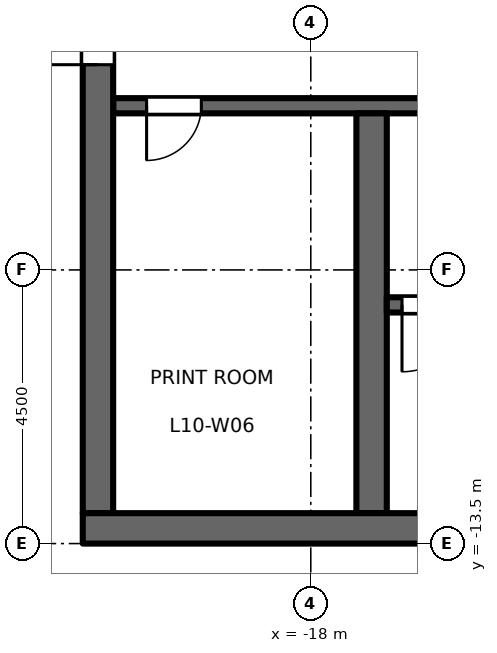
"""IFC4 building model, lengths in metres.
Left out: names, types, materials, properties, quantities, classifications, styles, units other than length and angle.
Written with IfcOpenShell. Run it as: python <this file> out.ifc"""

import sys

from ifc_helpers import new_model, si_unit, direction, frame, frame_2d, origin, place, context, subcontext, project, spatial, rectangle, extrude, element, fill, save


model = new_model("IFC4")
c1 = context("Model", 3, precision=1e-05, world=origin(), true_north=direction((0.0, 1.0)))
c2 = subcontext(c1, "Body", "Model", "MODEL_VIEW")
j1 = project(units=[si_unit("LENGTHUNIT", "METRE"), si_unit("PLANEANGLEUNIT", "RADIAN")], contexts=[c1])
p1 = place(None, origin())
s1 = spatial("IfcSite", under=j1, at=p1, CompositionType="ELEMENT")
p2 = place(p1, origin())
s2 = spatial("IfcBuilding", under=s1, at=p2, CompositionType="ELEMENT")
p3 = place(p2, frame((0.0, 0.0, 49.2)))
s3 = spatial("IfcBuildingStorey", under=s2, at=p3, CompositionType="ELEMENT", Elevation=49.2)
p4 = place(p3, frame((-12.15, -6.3, 0.0), z_axis=(0.0, 0.0, 1.0), x_axis=(-1.0, 0.0, 0.0)))
e1 = element("IfcWall", 1, at=p4, inside=s3, PredefinedType="SHEAR", context=c2, shape_type="SweptSolid", body=[
    extrude(rectangle(XDim=9.1, YDim=0.25, at=frame_2d((4.55, 0.0))), origin(), (0.0, 0.0, 1.0), 4.35),
])
p5 = place(p4, frame((1.8, 0.0, 0.0)))
e2 = element("IfcOpeningElement", 2, at=p5, cuts=e1, PredefinedType="OPENING", context=c2, shape_type="SweptSolid", body=[
    extrude(rectangle(XDim=1.0, YDim=2.1, at=frame_2d((0.5, 1.05))), frame((0.0, 0.135, 0.0), z_axis=(0.0, -1.0, 0.0), x_axis=(1.0, 0.0, 0.0)), (0.0, 0.0, 1.0), 0.27),
])
p6 = place(p4, frame((7.65, 0.0, 0.0)))
e3 = element("IfcOpeningElement", 3, at=p6, cuts=e1, PredefinedType="OPENING", context=c2, shape_type="SweptSolid", body=[
    extrude(rectangle(XDim=0.9, YDim=2.1, at=frame_2d((0.45, 1.05))), frame((0.0, 0.135, 0.0), z_axis=(0.0, -1.0, 0.0), x_axis=(1.0, 0.0, 0.0)), (0.0, 0.0, 1.0), 0.27),
])
p7 = place(p3, frame((-21.5, -13.0, 0.0), z_axis=(0.0, 0.0, 1.0), x_axis=(0.0, 1.0, 0.0)))
e4 = element("IfcWall", 4, at=p7, inside=s3, PredefinedType="SHEAR", context=c2, shape_type="SweptSolid", body=[
    extrude(rectangle(XDim=26.0, YDim=0.5, at=frame_2d((13.0, 0.0))), origin(), (0.0, 0.0, 1.0), 4.35),
])
p8 = place(p7, frame((16.825, 0.0, 0.0)))
e5 = element("IfcOpeningElement", 5, at=p8, cuts=e4, PredefinedType="OPENING", context=c2, shape_type="SweptSolid", body=[
    extrude(rectangle(XDim=1.8, YDim=2.1, at=frame_2d((0.9, 1.05))), frame((0.0, 0.26, 0.0), z_axis=(0.0, -1.0, 0.0), x_axis=(1.0, 0.0, 0.0)), (0.0, 0.0, 1.0), 0.52),
])
p9 = place(p7, frame((7.375, 0.0, 0.0)))
e6 = element("IfcOpeningElement", 6, at=p9, cuts=e4, PredefinedType="OPENING", context=c2, shape_type="SweptSolid", body=[
    extrude(rectangle(XDim=1.8, YDim=2.1, at=frame_2d((0.9, 1.05))), frame((0.0, 0.26, 0.0), z_axis=(0.0, -1.0, 0.0), x_axis=(1.0, 0.0, 0.0)), (0.0, 0.0, 1.0), 0.52),
])
p10 = place(p3, frame((-17.0, -13.0, 0.0), z_axis=(0.0, 0.0, 1.0), x_axis=(0.0, 1.0, 0.0)))
e7 = element("IfcWall", 7, at=p10, inside=s3, PredefinedType="SHEAR", context=c2, shape_type="SweptSolid", body=[
    extrude(rectangle(XDim=6.575, YDim=0.5, at=frame_2d((3.288, 0.0))), origin(), (0.0, 0.0, 1.0), 4.35),
])
p11 = place(p3, frame((-8.75, -9.575, 0.0), z_axis=(0.0, 0.0, 1.0), x_axis=(-1.0, 0.0, 0.0)))
e8 = element("IfcWall", 8, at=p11, inside=s3, PredefinedType="SHEAR", context=c2, shape_type="SweptSolid", body=[
    extrude(rectangle(XDim=8.0, YDim=0.25, at=frame_2d((4.0, 0.0))), origin(), (0.0, 0.0, 1.0), 4.35),
])
p12 = place(p11, frame((6.65, 0.0, 0.0)))
e9 = element("IfcOpeningElement", 9, at=p12, cuts=e8, PredefinedType="OPENING", context=c2, shape_type="SweptSolid", body=[
    extrude(rectangle(XDim=1.1, YDim=2.1, at=frame_2d((0.55, 1.05))), frame((0.0, 0.135, 0.0), z_axis=(0.0, -1.0, 0.0), x_axis=(1.0, 0.0, 0.0)), (0.0, 0.0, 1.0), 0.27),
])
p13 = place(p3, frame((-8.25, -13.25, 0.0), z_axis=(0.0, 0.0, 1.0), x_axis=(-1.0, 0.0, 0.0)))
e10 = element("IfcWall", 10, at=p13, inside=s3, PredefinedType="SHEAR", context=c2, shape_type="SweptSolid", body=[
    extrude(rectangle(XDim=13.5, YDim=0.5, at=frame_2d((6.75, 0.0))), origin(), (0.0, 0.0, 1.0), 4.35),
])
p14 = place(p12, origin())
e11 = element("IfcDoor", 11, at=p14, inside=s3, OperationType="SINGLE_SWING_LEFT", PredefinedType="DOOR", context=c2, shape_type="SweptSolid", body=[
    extrude(rectangle(XDim=1.1, YDim=2.1, at=frame_2d((0.55, 1.05))), frame((0.0, 0.025, 0.0), z_axis=(0.0, -1.0, 0.0), x_axis=(1.0, 0.0, 0.0)), (0.0, 0.0, 1.0), 0.05),
])
fill(e9, e11)
p15 = place(p9, origin())
e12 = element("IfcDoor", 12, at=p15, inside=s3, OperationType="DOUBLE_DOOR_DOUBLE_SWING", PredefinedType="DOOR", context=c2, shape_type="SweptSolid", body=[
    extrude(rectangle(XDim=1.8, YDim=2.1, at=frame_2d((0.9, 1.05))), frame((0.0, 0.025, 0.0), z_axis=(0.0, -1.0, 0.0), x_axis=(1.0, 0.0, 0.0)), (0.0, 0.0, 1.0), 0.05),
])
fill(e6, e12)
p16 = place(p6, origin())
e13 = element("IfcDoor", 13, at=p16, inside=s3, OperationType="SINGLE_SWING_LEFT", PredefinedType="DOOR", context=c2, shape_type="SweptSolid", body=[
    extrude(rectangle(XDim=0.9, YDim=2.1, at=frame_2d((0.45, 1.05))), frame((0.0, 0.025, 0.0), z_axis=(0.0, -1.0, 0.0), x_axis=(1.0, 0.0, 0.0)), (0.0, 0.0, 1.0), 0.05),
])
fill(e3, e13)
save(model, sys.argv[1])
